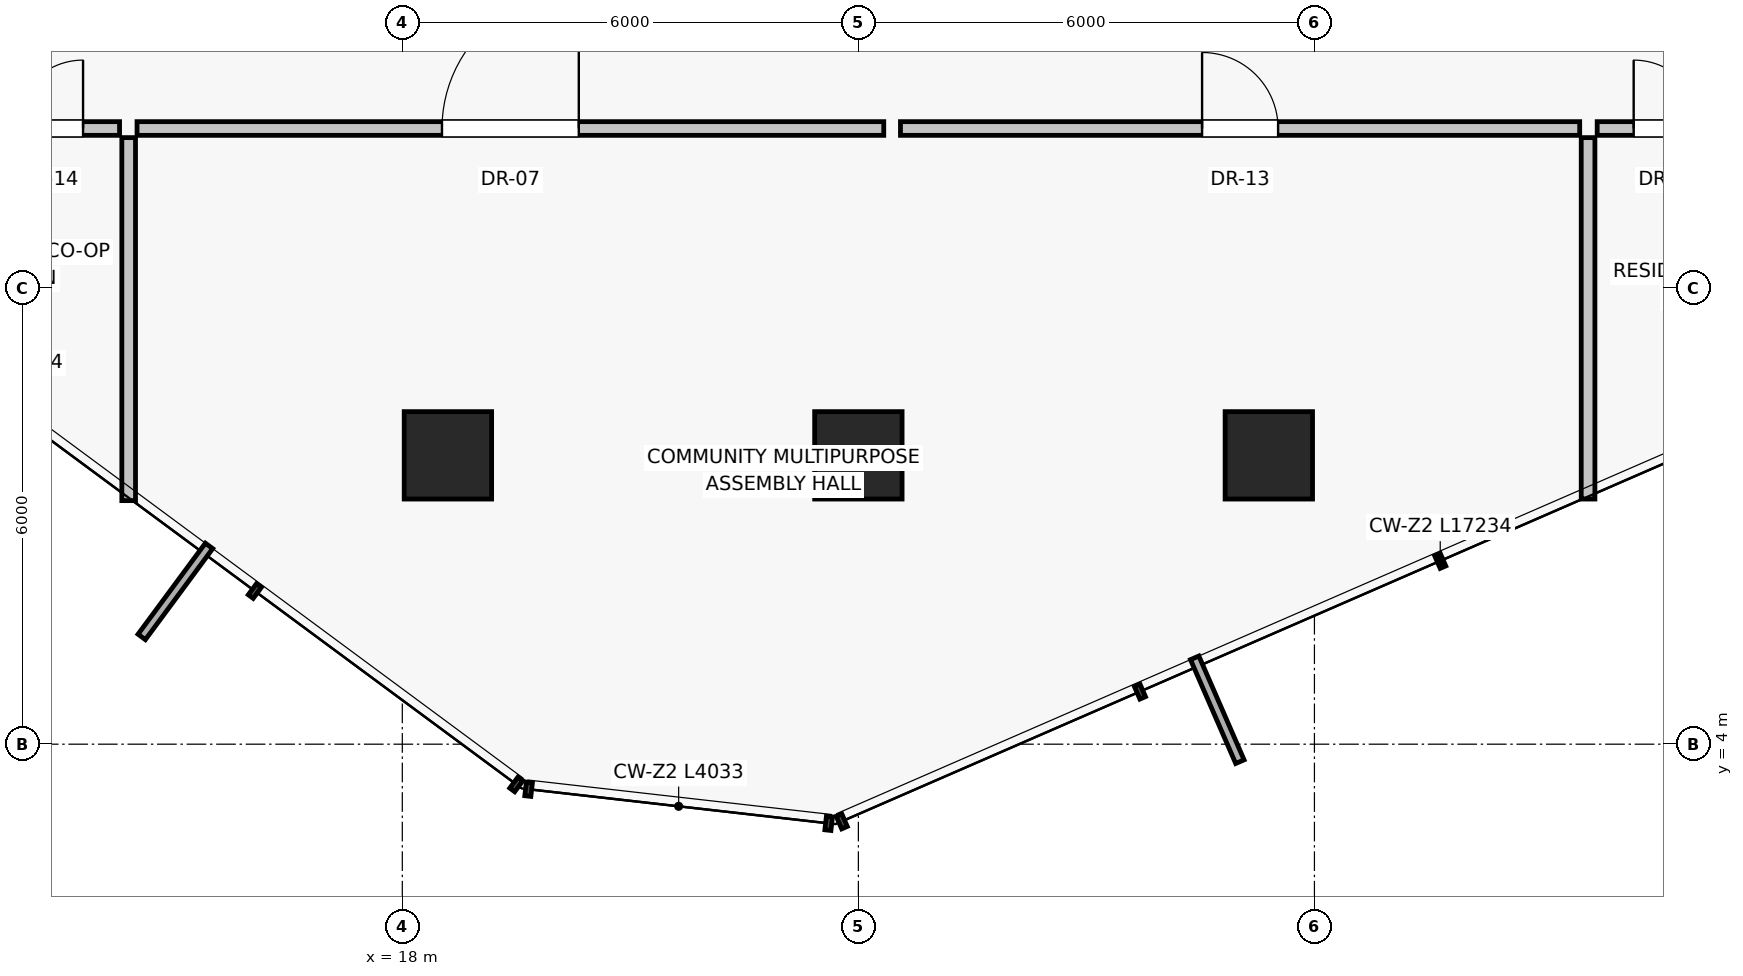
"""IFC4 building model, lengths in metres.
Left out: names, types, materials, properties, quantities, classifications, styles, units other than length and angle.
Written with IfcOpenShell. Run it as: python <this file> out.ifc"""

import sys

from ifc_helpers import new_model, si_unit, direction, frame, frame_2d, origin, origin_2d, place, context, subcontext, project, spatial, rectangle, extrude, source, transform, mapped, element, fill, save


model = new_model("IFC4")
c1 = context("Model", 3, precision=1e-05, world=origin(), true_north=direction((0.0, 1.0)))
c2 = subcontext(c1, "Body", "Model", "MODEL_VIEW")
j1 = project(units=[si_unit("LENGTHUNIT", "METRE"), si_unit("PLANEANGLEUNIT", "RADIAN")], contexts=[c1])
p1 = place(None, origin())
s1 = spatial("IfcSite", under=j1, at=p1, CompositionType="ELEMENT")
p2 = place(p1, origin())
s2 = spatial("IfcBuilding", under=s1, at=p2, CompositionType="ELEMENT")
p3 = place(p2, frame((0.0, 0.0, 105.7)))
s3 = spatial("IfcBuildingStorey", under=s2, at=p3, CompositionType="ELEMENT", Elevation=105.7)
for number, where, z_axis, x_axis in (
    (1, (18.6, 7.8, 0.0), (0.0, 0.0, 1.0), (1.0, 0.0, 0.0)),
    (2, (24.0, 7.8, 0.0), (0.0, 0.0, 1.0), (1.0, 0.0, 0.0)),
    (3, (29.4, 7.8, 0.0), (0.0, 0.0, 1.0), (1.0, 0.0, 0.0)),
):
    element("IfcColumn", number, at=place(p3, frame(where, z_axis=z_axis, x_axis=x_axis)), inside=s3, PredefinedType="COLUMN", context=c2, shape_type="SweptSolid", body=[
        extrude(rectangle(XDim=1.15, YDim=1.15, at=origin_2d()), origin(), (0.0, 0.0, 1.0), 3.25),
    ])
p4 = place(p3, frame((14.4, 11.98, 0.0), z_axis=(0.0, 0.0, 1.0), x_axis=(0.0, -1.0, 0.0)))
e4 = element("IfcWall", 4, at=p4, inside=s3, PredefinedType="PARTITIONING", context=c2, shape_type="SweptSolid", body=[
    extrude(rectangle(XDim=4.776, YDim=0.18, at=frame_2d((2.388, 0.0))), origin(), (0.0, 0.0, 1.0), 2.97),
])
p5 = place(p3, frame((33.6, 11.98, 0.0), z_axis=(0.0, 0.0, 1.0), x_axis=(0.0, -1.0, 0.0)))
e5 = element("IfcWall", 5, at=p5, inside=s3, PredefinedType="PARTITIONING", context=c2, shape_type="SweptSolid", body=[
    extrude(rectangle(XDim=4.755, YDim=0.18, at=frame_2d((2.377, 0.0))), origin(), (0.0, 0.0, 1.0), 2.97),
])
p6 = place(p3, frame((14.51, 12.1, 0.0), z_axis=(0.0, 0.0, 1.0), x_axis=(1.0, 0.0, 0.0)))
e6 = element("IfcWall", 6, at=p6, inside=s3, PredefinedType="PARTITIONING", context=c2, shape_type="SweptSolid", body=[
    extrude(rectangle(XDim=9.824, YDim=0.18, at=frame_2d((4.912, 0.0))), origin(), (0.0, 0.0, 1.0), 2.55),
])
p7 = place(p6, frame((4.012, 0.0, 0.0)))
e7 = element("IfcOpeningElement", 7, at=p7, cuts=e6, PredefinedType="OPENING", context=c2, shape_type="SweptSolid", body=[
    extrude(rectangle(XDim=1.8, YDim=2.25, at=frame_2d((0.9, 1.125))), frame((0.0, 0.1, 0.0), z_axis=(0.0, -1.0, 0.0), x_axis=(1.0, 0.0, 0.0)), (0.0, 0.0, 1.0), 0.2),
])
p8 = place(p3, frame((24.554, 12.1, 0.0), z_axis=(0.0, 0.0, 1.0), x_axis=(1.0, 0.0, 0.0)))
e8 = element("IfcWall", 8, at=p8, inside=s3, PredefinedType="PARTITIONING", context=c2, shape_type="SweptSolid", body=[
    extrude(rectangle(XDim=8.936, YDim=0.18, at=frame_2d((4.468, 0.0))), origin(), (0.0, 0.0, 1.0), 2.55),
])
p9 = place(p8, frame((3.968, 0.0, 0.0)))
e9 = element("IfcOpeningElement", 9, at=p9, cuts=e8, PredefinedType="OPENING", context=c2, shape_type="SweptSolid", body=[
    extrude(rectangle(XDim=1.0, YDim=2.01, at=frame_2d((0.5, 1.005))), frame((0.0, 0.1, 0.0), z_axis=(0.0, -1.0, 0.0), x_axis=(1.0, 0.0, 0.0)), (0.0, 0.0, 1.0), 0.2),
])
p10 = place(p3, frame((12.42, 12.1, 0.0), z_axis=(0.0, 0.0, 1.0), x_axis=(1.0, 0.0, 0.0)))
e10 = element("IfcWall", 10, at=p10, inside=s3, PredefinedType="PARTITIONING", context=c2, shape_type="SweptSolid", body=[
    extrude(rectangle(XDim=1.86, YDim=0.18, at=frame_2d((0.93, 0.0))), origin(), (0.0, 0.0, 1.0), 2.97),
])
p11 = place(p10, frame((0.48, 0.0, 0.0)))
e11 = element("IfcOpeningElement", 11, at=p11, cuts=e10, PredefinedType="OPENING", context=c2, shape_type="SweptSolid", body=[
    extrude(rectangle(XDim=0.9, YDim=2.01, at=frame_2d((0.45, 1.005))), frame((0.0, 0.1, 0.0), z_axis=(0.0, -1.0, 0.0), x_axis=(1.0, 0.0, 0.0)), (0.0, 0.0, 1.0), 0.2),
])
p12 = place(p3, frame((33.72, 12.1, 0.0), z_axis=(0.0, 0.0, 1.0), x_axis=(1.0, 0.0, 0.0)))
e12 = element("IfcWall", 12, at=p12, inside=s3, PredefinedType="PARTITIONING", context=c2, shape_type="SweptSolid", body=[
    extrude(rectangle(XDim=1.86, YDim=0.18, at=frame_2d((0.93, 0.0))), origin(), (0.0, 0.0, 1.0), 2.97),
])
p13 = place(p12, frame((0.48, 0.0, 0.0)))
e13 = element("IfcOpeningElement", 13, at=p13, cuts=e12, PredefinedType="OPENING", context=c2, shape_type="SweptSolid", body=[
    extrude(rectangle(XDim=0.9, YDim=2.01, at=frame_2d((0.45, 1.005))), frame((0.0, 0.1, 0.0), z_axis=(0.0, -1.0, 0.0), x_axis=(1.0, 0.0, 0.0)), (0.0, 0.0, 1.0), 0.2),
])
m1 = source(origin(), c2, "Body", "SweptSolid", [
    extrude(rectangle(XDim=1.8, YDim=2.25, at=frame_2d((0.9, 1.125))), frame((0.0, 0.025, 0.0), z_axis=(0.0, -1.0, 0.0), x_axis=(1.0, 0.0, 0.0)), (0.0, 0.0, 1.0), 0.05),
])
p14 = place(p7, origin())
e14 = element("IfcDoor", 14, at=p14, inside=s3, OperationType="SINGLE_SWING_RIGHT", PredefinedType="DOOR", context=c2, shape_type="MappedRepresentation", body=[
    mapped(m1, transform((0.0, 0.0, 0.0), scale=1.0)),
])
fill(e7, e14)
m2 = source(origin(), c2, "Body", "SweptSolid", [
    extrude(rectangle(XDim=1.0, YDim=2.01, at=frame_2d((0.5, 1.005))), frame((0.0, 0.025, 0.0), z_axis=(0.0, -1.0, 0.0), x_axis=(1.0, 0.0, 0.0)), (0.0, 0.0, 1.0), 0.05),
])
p15 = place(p9, origin())
e15 = element("IfcDoor", 15, at=p15, inside=s3, OperationType="SINGLE_SWING_LEFT", PredefinedType="DOOR", context=c2, shape_type="MappedRepresentation", body=[
    mapped(m2, transform((0.0, 0.0, 0.0), scale=1.0)),
])
fill(e9, e15)
m3 = source(origin(), c2, "Body", "SweptSolid", [
    extrude(rectangle(XDim=0.9, YDim=2.01, at=frame_2d((0.45, 1.005))), frame((0.0, 0.025, 0.0), z_axis=(0.0, -1.0, 0.0), x_axis=(1.0, 0.0, 0.0)), (0.0, 0.0, 1.0), 0.05),
])
p16 = place(p11, origin())
e16 = element("IfcDoor", 16, at=p16, inside=s3, OperationType="SINGLE_SWING_RIGHT", PredefinedType="DOOR", context=c2, shape_type="MappedRepresentation", body=[
    mapped(m3, transform((0.0, 0.0, 0.0), scale=1.0)),
])
fill(e11, e16)
p17 = place(p13, origin())
e17 = element("IfcDoor", 17, at=p17, inside=s3, OperationType="SINGLE_SWING_LEFT", PredefinedType="DOOR", context=c2, shape_type="MappedRepresentation", body=[
    mapped(m3, transform((0.0, 0.0, 0.0), scale=1.0)),
])
fill(e13, e17)
save(model, sys.argv[1])
